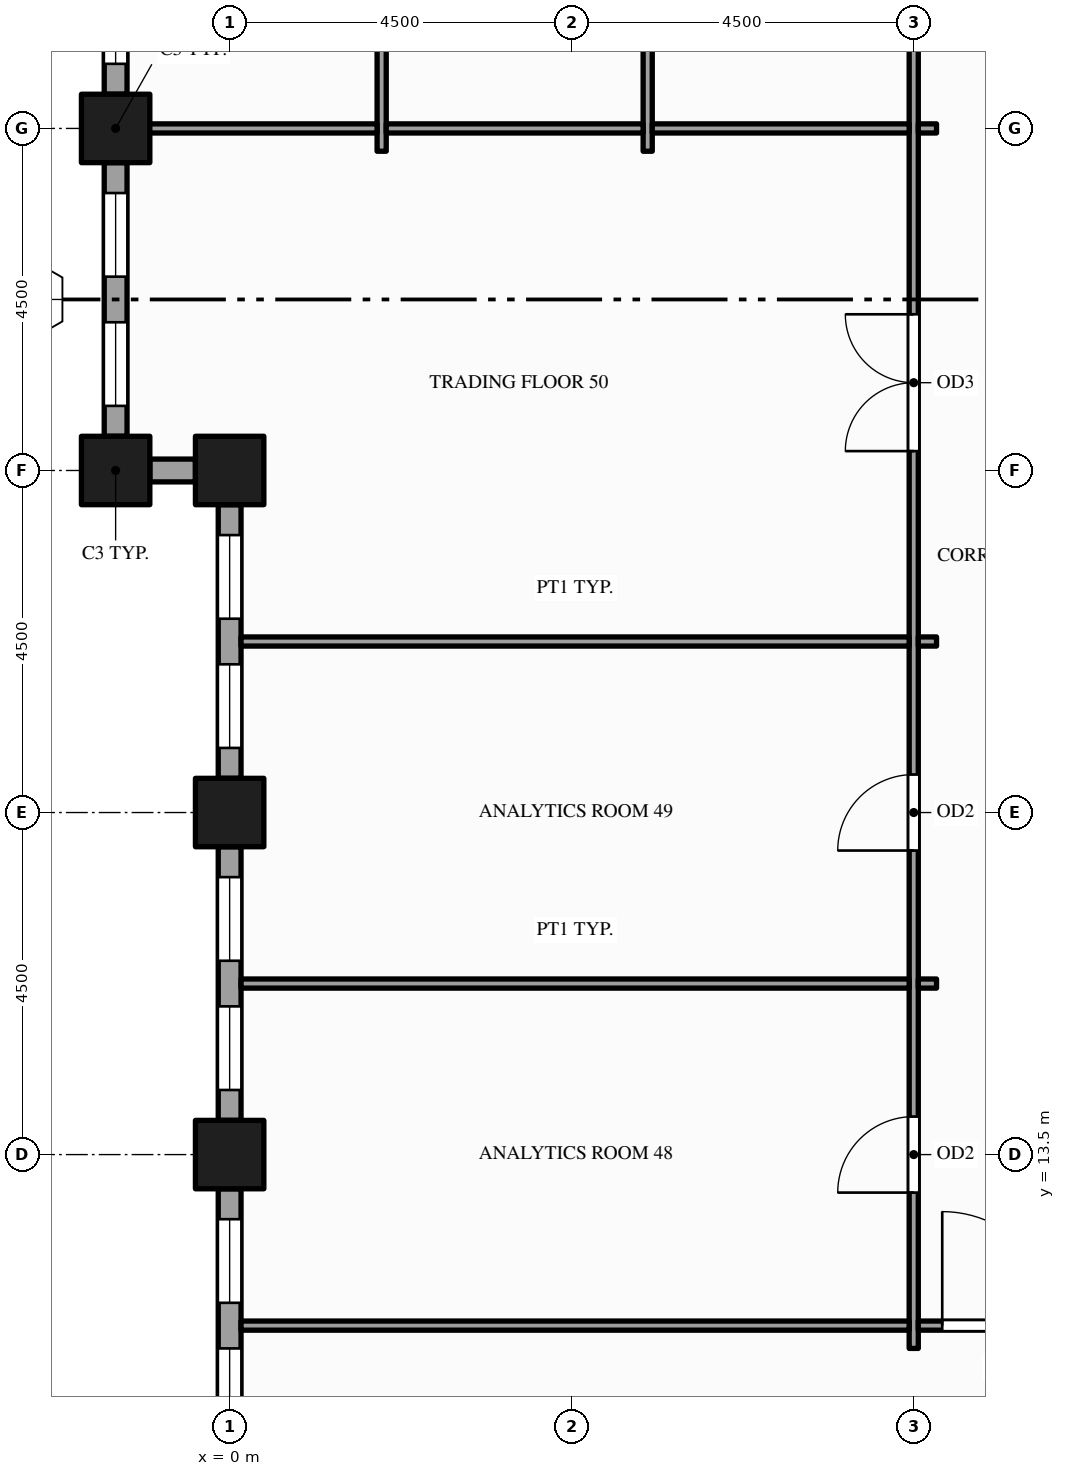
"""IFC4 building model, lengths in metres.
Left out: names, types, materials, properties, quantities, classifications, styles, units other than length and angle.
Written with IfcOpenShell. Run it as: python <this file> out.ifc"""

import sys

from ifc_helpers import new_model, si_unit, direction, frame, frame_2d, origin, origin_2d, place, context, subcontext, project, spatial, rectangle, hollow_rectangle, extrude, element, fill, save


model = new_model("IFC4")
c1 = context("Model", 3, precision=1e-05, world=origin(), true_north=direction((0.0, 1.0)))
c2 = subcontext(c1, "Body", "Model", "MODEL_VIEW")
j1 = project(units=[si_unit("LENGTHUNIT", "METRE"), si_unit("PLANEANGLEUNIT", "RADIAN")], contexts=[c1])
p1 = place(None, origin())
s1 = spatial("IfcSite", under=j1, at=p1, CompositionType="ELEMENT")
p2 = place(p1, origin())
s2 = spatial("IfcBuilding", under=s1, at=p2, CompositionType="ELEMENT")
p3 = place(p2, frame((0.0, 0.0, 139.0)))
s3 = spatial("IfcBuildingStorey", under=s2, at=p3, CompositionType="ELEMENT", Elevation=139.0)
for number, where, z_axis, x_axis in (
    (1, (-1.5, 22.5, -0.15), (0.0, 0.0, 1.0), (1.0, 0.0, 0.0)),
    (2, (-1.5, 27.0, -0.15), (0.0, 0.0, 1.0), (1.0, 0.0, 0.0)),
    (3, (0.0, 13.5, -0.15), (0.0, 0.0, 1.0), (1.0, 0.0, 0.0)),
    (4, (0.0, 18.0, -0.15), (0.0, 0.0, 1.0), (1.0, 0.0, 0.0)),
    (5, (0.0, 22.5, -0.15), (0.0, 0.0, 1.0), (1.0, 0.0, 0.0)),
):
    element("IfcColumn", number, at=place(p3, frame(where, z_axis=z_axis, x_axis=x_axis)), inside=s3, PredefinedType="COLUMN", context=c2, shape_type="SweptSolid", body=[
        extrude(hollow_rectangle(XDim=0.9, YDim=0.9, WallThickness=0.045, at=origin_2d()), origin(), (0.0, 0.0, 1.0), 4.0),
    ])
p4 = place(p3, frame((-1.5, 31.05, 0.0), z_axis=(0.0, 0.0, 1.0), x_axis=(0.0, -1.0, 0.0)))
e6 = element("IfcWall", 6, at=p4, inside=s3, PredefinedType="STANDARD", context=c2, shape_type="SweptSolid", body=[
    extrude(rectangle(XDim=3.6, YDim=0.3, at=frame_2d((1.8, 0.0))), origin(), (0.0, 0.0, 1.0), 3.149),
])
p5 = place(p4, frame((0.4, 0.0, 0.9)))
e7 = element("IfcOpeningElement", 7, at=p5, cuts=e6, PredefinedType="OPENING", context=c2, shape_type="SweptSolid", body=[
    extrude(rectangle(XDim=1.1, YDim=2.0, at=frame_2d((0.55, 1.0))), frame((0.0, 0.16, 0.0), z_axis=(0.0, -1.0, 0.0), x_axis=(1.0, 0.0, 0.0)), (0.0, 0.0, 1.0), 0.32),
])
p6 = place(p4, frame((2.1, 0.0, 0.9)))
e8 = element("IfcOpeningElement", 8, at=p6, cuts=e6, PredefinedType="OPENING", context=c2, shape_type="SweptSolid", body=[
    extrude(rectangle(XDim=1.1, YDim=2.0, at=frame_2d((0.55, 1.0))), frame((0.0, 0.16, 0.0), z_axis=(0.0, -1.0, 0.0), x_axis=(1.0, 0.0, 0.0)), (0.0, 0.0, 1.0), 0.32),
])
p7 = place(p3, frame((-1.5, 26.55, 0.0), z_axis=(0.0, 0.0, 1.0), x_axis=(0.0, -1.0, 0.0)))
e9 = element("IfcWall", 9, at=p7, inside=s3, PredefinedType="STANDARD", context=c2, shape_type="SweptSolid", body=[
    extrude(rectangle(XDim=3.6, YDim=0.3, at=frame_2d((1.8, 0.0))), origin(), (0.0, 0.0, 1.0), 3.149),
])
p8 = place(p7, frame((0.4, 0.0, 0.9)))
e10 = element("IfcOpeningElement", 10, at=p8, cuts=e9, PredefinedType="OPENING", context=c2, shape_type="SweptSolid", body=[
    extrude(rectangle(XDim=1.1, YDim=2.0, at=frame_2d((0.55, 1.0))), frame((0.0, 0.16, 0.0), z_axis=(0.0, -1.0, 0.0), x_axis=(1.0, 0.0, 0.0)), (0.0, 0.0, 1.0), 0.32),
])
p9 = place(p7, frame((2.1, 0.0, 0.9)))
e11 = element("IfcOpeningElement", 11, at=p9, cuts=e9, PredefinedType="OPENING", context=c2, shape_type="SweptSolid", body=[
    extrude(rectangle(XDim=1.1, YDim=2.0, at=frame_2d((0.55, 1.0))), frame((0.0, 0.16, 0.0), z_axis=(0.0, -1.0, 0.0), x_axis=(1.0, 0.0, 0.0)), (0.0, 0.0, 1.0), 0.32),
])
p10 = place(p3, frame((-1.05, 22.5, 0.0), z_axis=(0.0, 0.0, 1.0), x_axis=(1.0, 0.0, 0.0)))
e12 = element("IfcWall", 12, at=p10, inside=s3, PredefinedType="STANDARD", context=c2, shape_type="SweptSolid", body=[
    extrude(rectangle(XDim=0.6, YDim=0.3, at=frame_2d((0.3, 0.0))), origin(), (0.0, 0.0, 1.0), 3.149),
])
p11 = place(p3, frame((0.0, 22.05, 0.0), z_axis=(0.0, 0.0, 1.0), x_axis=(0.0, -1.0, 0.0)))
e13 = element("IfcWall", 13, at=p11, inside=s3, PredefinedType="STANDARD", context=c2, shape_type="SweptSolid", body=[
    extrude(rectangle(XDim=3.6, YDim=0.3, at=frame_2d((1.8, 0.0))), origin(), (0.0, 0.0, 1.0), 3.149),
])
p12 = place(p11, frame((0.4, 0.0, 0.9)))
e14 = element("IfcOpeningElement", 14, at=p12, cuts=e13, PredefinedType="OPENING", context=c2, shape_type="SweptSolid", body=[
    extrude(rectangle(XDim=1.1, YDim=2.0, at=frame_2d((0.55, 1.0))), frame((0.0, 0.16, 0.0), z_axis=(0.0, -1.0, 0.0), x_axis=(1.0, 0.0, 0.0)), (0.0, 0.0, 1.0), 0.32),
])
p13 = place(p11, frame((2.1, 0.0, 0.9)))
e15 = element("IfcOpeningElement", 15, at=p13, cuts=e13, PredefinedType="OPENING", context=c2, shape_type="SweptSolid", body=[
    extrude(rectangle(XDim=1.1, YDim=2.0, at=frame_2d((0.55, 1.0))), frame((0.0, 0.16, 0.0), z_axis=(0.0, -1.0, 0.0), x_axis=(1.0, 0.0, 0.0)), (0.0, 0.0, 1.0), 0.32),
])
p14 = place(p3, frame((0.0, 17.55, 0.0), z_axis=(0.0, 0.0, 1.0), x_axis=(0.0, -1.0, 0.0)))
e16 = element("IfcWall", 16, at=p14, inside=s3, PredefinedType="STANDARD", context=c2, shape_type="SweptSolid", body=[
    extrude(rectangle(XDim=3.6, YDim=0.3, at=frame_2d((1.8, 0.0))), origin(), (0.0, 0.0, 1.0), 3.149),
])
p15 = place(p14, frame((0.4, 0.0, 0.9)))
e17 = element("IfcOpeningElement", 17, at=p15, cuts=e16, PredefinedType="OPENING", context=c2, shape_type="SweptSolid", body=[
    extrude(rectangle(XDim=1.1, YDim=2.0, at=frame_2d((0.55, 1.0))), frame((0.0, 0.16, 0.0), z_axis=(0.0, -1.0, 0.0), x_axis=(1.0, 0.0, 0.0)), (0.0, 0.0, 1.0), 0.32),
])
p16 = place(p14, frame((2.1, 0.0, 0.9)))
e18 = element("IfcOpeningElement", 18, at=p16, cuts=e16, PredefinedType="OPENING", context=c2, shape_type="SweptSolid", body=[
    extrude(rectangle(XDim=1.1, YDim=2.0, at=frame_2d((0.55, 1.0))), frame((0.0, 0.16, 0.0), z_axis=(0.0, -1.0, 0.0), x_axis=(1.0, 0.0, 0.0)), (0.0, 0.0, 1.0), 0.32),
])
p17 = place(p3, frame((0.0, 13.05, 0.0), z_axis=(0.0, 0.0, 1.0), x_axis=(0.0, -1.0, 0.0)))
e19 = element("IfcWall", 19, at=p17, inside=s3, PredefinedType="STANDARD", context=c2, shape_type="SweptSolid", body=[
    extrude(rectangle(XDim=3.6, YDim=0.3, at=frame_2d((1.8, 0.0))), origin(), (0.0, 0.0, 1.0), 3.149),
])
p18 = place(p17, frame((0.4, 0.0, 0.9)))
e20 = element("IfcOpeningElement", 20, at=p18, cuts=e19, PredefinedType="OPENING", context=c2, shape_type="SweptSolid", body=[
    extrude(rectangle(XDim=1.1, YDim=2.0, at=frame_2d((0.55, 1.0))), frame((0.0, 0.16, 0.0), z_axis=(0.0, -1.0, 0.0), x_axis=(1.0, 0.0, 0.0)), (0.0, 0.0, 1.0), 0.32),
])
p19 = place(p17, frame((2.1, 0.0, 0.9)))
e21 = element("IfcOpeningElement", 21, at=p19, cuts=e19, PredefinedType="OPENING", context=c2, shape_type="SweptSolid", body=[
    extrude(rectangle(XDim=1.1, YDim=2.0, at=frame_2d((0.55, 1.0))), frame((0.0, 0.16, 0.0), z_axis=(0.0, -1.0, 0.0), x_axis=(1.0, 0.0, 0.0)), (0.0, 0.0, 1.0), 0.32),
])
for number, where, z_axis, x_axis in (
    (22, (2.0, 26.7, 0.0), (0.0, 0.0, 1.0), (0.0, 1.0, 0.0)),
    (23, (5.5, 26.7, 0.0), (0.0, 0.0, 1.0), (0.0, 1.0, 0.0)),
):
    element("IfcWall", number, at=place(p3, frame(where, z_axis=z_axis, x_axis=x_axis)), inside=s3, PredefinedType="PARTITIONING", context=c2, shape_type="SweptSolid", body=[
        extrude(rectangle(XDim=5.1, YDim=0.12, at=frame_2d((2.55, 0.0))), origin(), (0.0, 0.0, 1.0), 3.85),
    ])
p20 = place(p3, frame((9.0, 10.95, 0.0), z_axis=(0.0, 0.0, 1.0), x_axis=(0.0, 1.0, 0.0)))
e24 = element("IfcWall", 24, at=p20, inside=s3, PredefinedType="PARTITIONING", context=c2, shape_type="SweptSolid", body=[
    extrude(rectangle(XDim=20.85, YDim=0.12, at=frame_2d((10.425, 0.0))), origin(), (0.0, 0.0, 1.0), 2.6),
])
p21 = place(p20, frame((2.05, 0.0, 0.0)))
e25 = element("IfcOpeningElement", 25, at=p21, cuts=e24, PredefinedType="OPENING", context=c2, shape_type="SweptSolid", body=[
    extrude(rectangle(XDim=1.0, YDim=2.1, at=frame_2d((0.5, 1.05))), frame((0.0, 0.07, 0.0), z_axis=(0.0, -1.0, 0.0), x_axis=(1.0, 0.0, 0.0)), (0.0, 0.0, 1.0), 0.14),
])
p22 = place(p20, frame((6.55, 0.0, 0.0)))
e26 = element("IfcOpeningElement", 26, at=p22, cuts=e24, PredefinedType="OPENING", context=c2, shape_type="SweptSolid", body=[
    extrude(rectangle(XDim=1.0, YDim=2.1, at=frame_2d((0.5, 1.05))), frame((0.0, 0.07, 0.0), z_axis=(0.0, -1.0, 0.0), x_axis=(1.0, 0.0, 0.0)), (0.0, 0.0, 1.0), 0.14),
])
p23 = place(p20, frame((11.805, 0.0, 0.0)))
e27 = element("IfcOpeningElement", 27, at=p23, cuts=e24, PredefinedType="OPENING", context=c2, shape_type="SweptSolid", body=[
    extrude(rectangle(XDim=1.8, YDim=2.1, at=frame_2d((0.9, 1.05))), frame((0.0, 0.07, 0.0), z_axis=(0.0, -1.0, 0.0), x_axis=(1.0, 0.0, 0.0)), (0.0, 0.0, 1.0), 0.14),
])
p24 = place(p3, frame((0.15, 11.25, 0.0), z_axis=(0.0, 0.0, 1.0), x_axis=(1.0, 0.0, 0.0)))
e28 = element("IfcWall", 28, at=p24, inside=s3, PredefinedType="PARTITIONING", context=c2, shape_type="SweptSolid", body=[
    extrude(rectangle(XDim=8.79, YDim=0.12, at=frame_2d((4.395, 0.0))), origin(), (0.0, 0.0, 1.0), 2.87),
])
p25 = place(p3, frame((9.06, 11.25, 0.0), z_axis=(0.0, 0.0, 1.0), x_axis=(1.0, 0.0, 0.0)))
e29 = element("IfcWall", 29, at=p25, inside=s3, PredefinedType="PARTITIONING", context=c2, shape_type="SweptSolid", body=[
    extrude(rectangle(XDim=2.13, YDim=0.12, at=frame_2d((1.065, 0.0))), origin(), (0.0, 0.0, 1.0), 2.87),
])
p26 = place(p25, frame((0.315, 0.0, 0.0)))
e30 = element("IfcOpeningElement", 30, at=p26, cuts=e29, PredefinedType="OPENING", context=c2, shape_type="SweptSolid", body=[
    extrude(rectangle(XDim=1.5, YDim=2.1, at=frame_2d((0.75, 1.05))), frame((0.0, 0.07, 0.0), z_axis=(0.0, -1.0, 0.0), x_axis=(1.0, 0.0, 0.0)), (0.0, 0.0, 1.0), 0.14),
])
p27 = place(p3, frame((0.15, 15.75, 0.0), z_axis=(0.0, 0.0, 1.0), x_axis=(1.0, 0.0, 0.0)))
e31 = element("IfcWall", 31, at=p27, inside=s3, PredefinedType="PARTITIONING", context=c2, shape_type="SweptSolid", body=[
    extrude(rectangle(XDim=8.79, YDim=0.12, at=frame_2d((4.395, 0.0))), origin(), (0.0, 0.0, 1.0), 2.87),
])
p28 = place(p3, frame((9.06, 15.75, 0.0), z_axis=(0.0, 0.0, 1.0), x_axis=(1.0, 0.0, 0.0)))
e32 = element("IfcWall", 32, at=p28, inside=s3, PredefinedType="PARTITIONING", context=c2, shape_type="SweptSolid", body=[
    extrude(rectangle(XDim=0.24, YDim=0.12, at=frame_2d((0.12, 0.0))), origin(), (0.0, 0.0, 1.0), 2.87),
])
p29 = place(p3, frame((0.15, 20.25, 0.0), z_axis=(0.0, 0.0, 1.0), x_axis=(1.0, 0.0, 0.0)))
e33 = element("IfcWall", 33, at=p29, inside=s3, PredefinedType="PARTITIONING", context=c2, shape_type="SweptSolid", body=[
    extrude(rectangle(XDim=8.79, YDim=0.12, at=frame_2d((4.395, 0.0))), origin(), (0.0, 0.0, 1.0), 2.87),
])
p30 = place(p3, frame((9.06, 20.25, 0.0), z_axis=(0.0, 0.0, 1.0), x_axis=(1.0, 0.0, 0.0)))
e34 = element("IfcWall", 34, at=p30, inside=s3, PredefinedType="PARTITIONING", context=c2, shape_type="SweptSolid", body=[
    extrude(rectangle(XDim=0.24, YDim=0.12, at=frame_2d((0.12, 0.0))), origin(), (0.0, 0.0, 1.0), 2.87),
])
p31 = place(p3, frame((-1.35, 27.0, 0.0), z_axis=(0.0, 0.0, 1.0), x_axis=(1.0, 0.0, 0.0)))
e35 = element("IfcWall", 35, at=p31, inside=s3, PredefinedType="PARTITIONING", context=c2, shape_type="SweptSolid", body=[
    extrude(rectangle(XDim=3.29, YDim=0.12, at=frame_2d((1.645, 0.0))), origin(), (0.0, 0.0, 1.0), 2.87),
])
for number, where, z_axis, x_axis in (
    (36, (2.06, 27.0, 0.0), (0.0, 0.0, 1.0), (1.0, 0.0, 0.0)),
    (37, (5.56, 27.0, 0.0), (0.0, 0.0, 1.0), (1.0, 0.0, 0.0)),
):
    element("IfcWall", number, at=place(p3, frame(where, z_axis=z_axis, x_axis=x_axis)), inside=s3, PredefinedType="PARTITIONING", context=c2, shape_type="SweptSolid", body=[
        extrude(rectangle(XDim=3.38, YDim=0.12, at=frame_2d((1.69, 0.0))), origin(), (0.0, 0.0, 1.0), 2.87),
    ])
p32 = place(p3, frame((9.06, 27.0, 0.0), z_axis=(0.0, 0.0, 1.0), x_axis=(1.0, 0.0, 0.0)))
e38 = element("IfcWall", 38, at=p32, inside=s3, PredefinedType="PARTITIONING", context=c2, shape_type="SweptSolid", body=[
    extrude(rectangle(XDim=0.24, YDim=0.12, at=frame_2d((0.12, 0.0))), origin(), (0.0, 0.0, 1.0), 2.87),
])
p33 = place(p6, origin())
e39 = element("IfcWindow", 39, at=p33, inside=s3, PartitioningType="SINGLE_PANEL", PredefinedType="WINDOW", context=c2, shape_type="SweptSolid", body=[
    extrude(rectangle(XDim=1.1, YDim=2.0, at=frame_2d((0.55, 1.0))), frame((0.0, 0.03, 0.0), z_axis=(0.0, -1.0, 0.0), x_axis=(1.0, 0.0, 0.0)), (0.0, 0.0, 1.0), 0.06),
])
fill(e8, e39)
p34 = place(p8, origin())
e40 = element("IfcWindow", 40, at=p34, inside=s3, PartitioningType="SINGLE_PANEL", PredefinedType="WINDOW", context=c2, shape_type="SweptSolid", body=[
    extrude(rectangle(XDim=1.1, YDim=2.0, at=frame_2d((0.55, 1.0))), frame((0.0, 0.03, 0.0), z_axis=(0.0, -1.0, 0.0), x_axis=(1.0, 0.0, 0.0)), (0.0, 0.0, 1.0), 0.06),
])
fill(e10, e40)
p35 = place(p9, origin())
e41 = element("IfcWindow", 41, at=p35, inside=s3, PartitioningType="SINGLE_PANEL", PredefinedType="WINDOW", context=c2, shape_type="SweptSolid", body=[
    extrude(rectangle(XDim=1.1, YDim=2.0, at=frame_2d((0.55, 1.0))), frame((0.0, 0.03, 0.0), z_axis=(0.0, -1.0, 0.0), x_axis=(1.0, 0.0, 0.0)), (0.0, 0.0, 1.0), 0.06),
])
fill(e11, e41)
p36 = place(p12, origin())
e42 = element("IfcWindow", 42, at=p36, inside=s3, PartitioningType="SINGLE_PANEL", PredefinedType="WINDOW", context=c2, shape_type="SweptSolid", body=[
    extrude(rectangle(XDim=1.1, YDim=2.0, at=frame_2d((0.55, 1.0))), frame((0.0, 0.03, 0.0), z_axis=(0.0, -1.0, 0.0), x_axis=(1.0, 0.0, 0.0)), (0.0, 0.0, 1.0), 0.06),
])
fill(e14, e42)
p37 = place(p13, origin())
e43 = element("IfcWindow", 43, at=p37, inside=s3, PartitioningType="SINGLE_PANEL", PredefinedType="WINDOW", context=c2, shape_type="SweptSolid", body=[
    extrude(rectangle(XDim=1.1, YDim=2.0, at=frame_2d((0.55, 1.0))), frame((0.0, 0.03, 0.0), z_axis=(0.0, -1.0, 0.0), x_axis=(1.0, 0.0, 0.0)), (0.0, 0.0, 1.0), 0.06),
])
fill(e15, e43)
p38 = place(p15, origin())
e44 = element("IfcWindow", 44, at=p38, inside=s3, PartitioningType="SINGLE_PANEL", PredefinedType="WINDOW", context=c2, shape_type="SweptSolid", body=[
    extrude(rectangle(XDim=1.1, YDim=2.0, at=frame_2d((0.55, 1.0))), frame((0.0, 0.03, 0.0), z_axis=(0.0, -1.0, 0.0), x_axis=(1.0, 0.0, 0.0)), (0.0, 0.0, 1.0), 0.06),
])
fill(e17, e44)
p39 = place(p16, origin())
e45 = element("IfcWindow", 45, at=p39, inside=s3, PartitioningType="SINGLE_PANEL", PredefinedType="WINDOW", context=c2, shape_type="SweptSolid", body=[
    extrude(rectangle(XDim=1.1, YDim=2.0, at=frame_2d((0.55, 1.0))), frame((0.0, 0.03, 0.0), z_axis=(0.0, -1.0, 0.0), x_axis=(1.0, 0.0, 0.0)), (0.0, 0.0, 1.0), 0.06),
])
fill(e18, e45)
p40 = place(p18, origin())
e46 = element("IfcWindow", 46, at=p40, inside=s3, PartitioningType="SINGLE_PANEL", PredefinedType="WINDOW", context=c2, shape_type="SweptSolid", body=[
    extrude(rectangle(XDim=1.1, YDim=2.0, at=frame_2d((0.55, 1.0))), frame((0.0, 0.03, 0.0), z_axis=(0.0, -1.0, 0.0), x_axis=(1.0, 0.0, 0.0)), (0.0, 0.0, 1.0), 0.06),
])
fill(e20, e46)
p41 = place(p19, origin())
e47 = element("IfcWindow", 47, at=p41, inside=s3, PartitioningType="SINGLE_PANEL", PredefinedType="WINDOW", context=c2, shape_type="SweptSolid", body=[
    extrude(rectangle(XDim=1.1, YDim=2.0, at=frame_2d((0.55, 1.0))), frame((0.0, 0.03, 0.0), z_axis=(0.0, -1.0, 0.0), x_axis=(1.0, 0.0, 0.0)), (0.0, 0.0, 1.0), 0.06),
])
fill(e21, e47)
p42 = place(p26, origin())
e48 = element("IfcDoor", 48, at=p42, inside=s3, OperationType="SINGLE_SWING_LEFT", PredefinedType="DOOR", context=c2, shape_type="SweptSolid", body=[
    extrude(rectangle(XDim=1.5, YDim=2.1, at=frame_2d((0.75, 1.05))), frame((0.0, 0.025, 0.0), z_axis=(0.0, -1.0, 0.0), x_axis=(1.0, 0.0, 0.0)), (0.0, 0.0, 1.0), 0.05),
])
fill(e30, e48)
p43 = place(p21, origin())
e49 = element("IfcDoor", 49, at=p43, inside=s3, OperationType="SINGLE_SWING_LEFT", PredefinedType="DOOR", context=c2, shape_type="SweptSolid", body=[
    extrude(rectangle(XDim=1.0, YDim=2.1, at=frame_2d((0.5, 1.05))), frame((0.0, 0.025, 0.0), z_axis=(0.0, -1.0, 0.0), x_axis=(1.0, 0.0, 0.0)), (0.0, 0.0, 1.0), 0.05),
])
fill(e25, e49)
p44 = place(p22, origin())
e50 = element("IfcDoor", 50, at=p44, inside=s3, OperationType="SINGLE_SWING_LEFT", PredefinedType="DOOR", context=c2, shape_type="SweptSolid", body=[
    extrude(rectangle(XDim=1.0, YDim=2.1, at=frame_2d((0.5, 1.05))), frame((0.0, 0.025, 0.0), z_axis=(0.0, -1.0, 0.0), x_axis=(1.0, 0.0, 0.0)), (0.0, 0.0, 1.0), 0.05),
])
fill(e26, e50)
p45 = place(p23, origin())
e51 = element("IfcDoor", 51, at=p45, inside=s3, OperationType="DOUBLE_DOOR_SINGLE_SWING", PredefinedType="DOOR", context=c2, shape_type="SweptSolid", body=[
    extrude(rectangle(XDim=1.8, YDim=2.1, at=frame_2d((0.9, 1.05))), frame((0.0, 0.025, 0.0), z_axis=(0.0, -1.0, 0.0), x_axis=(1.0, 0.0, 0.0)), (0.0, 0.0, 1.0), 0.05),
])
fill(e27, e51)
save(model, sys.argv[1])
